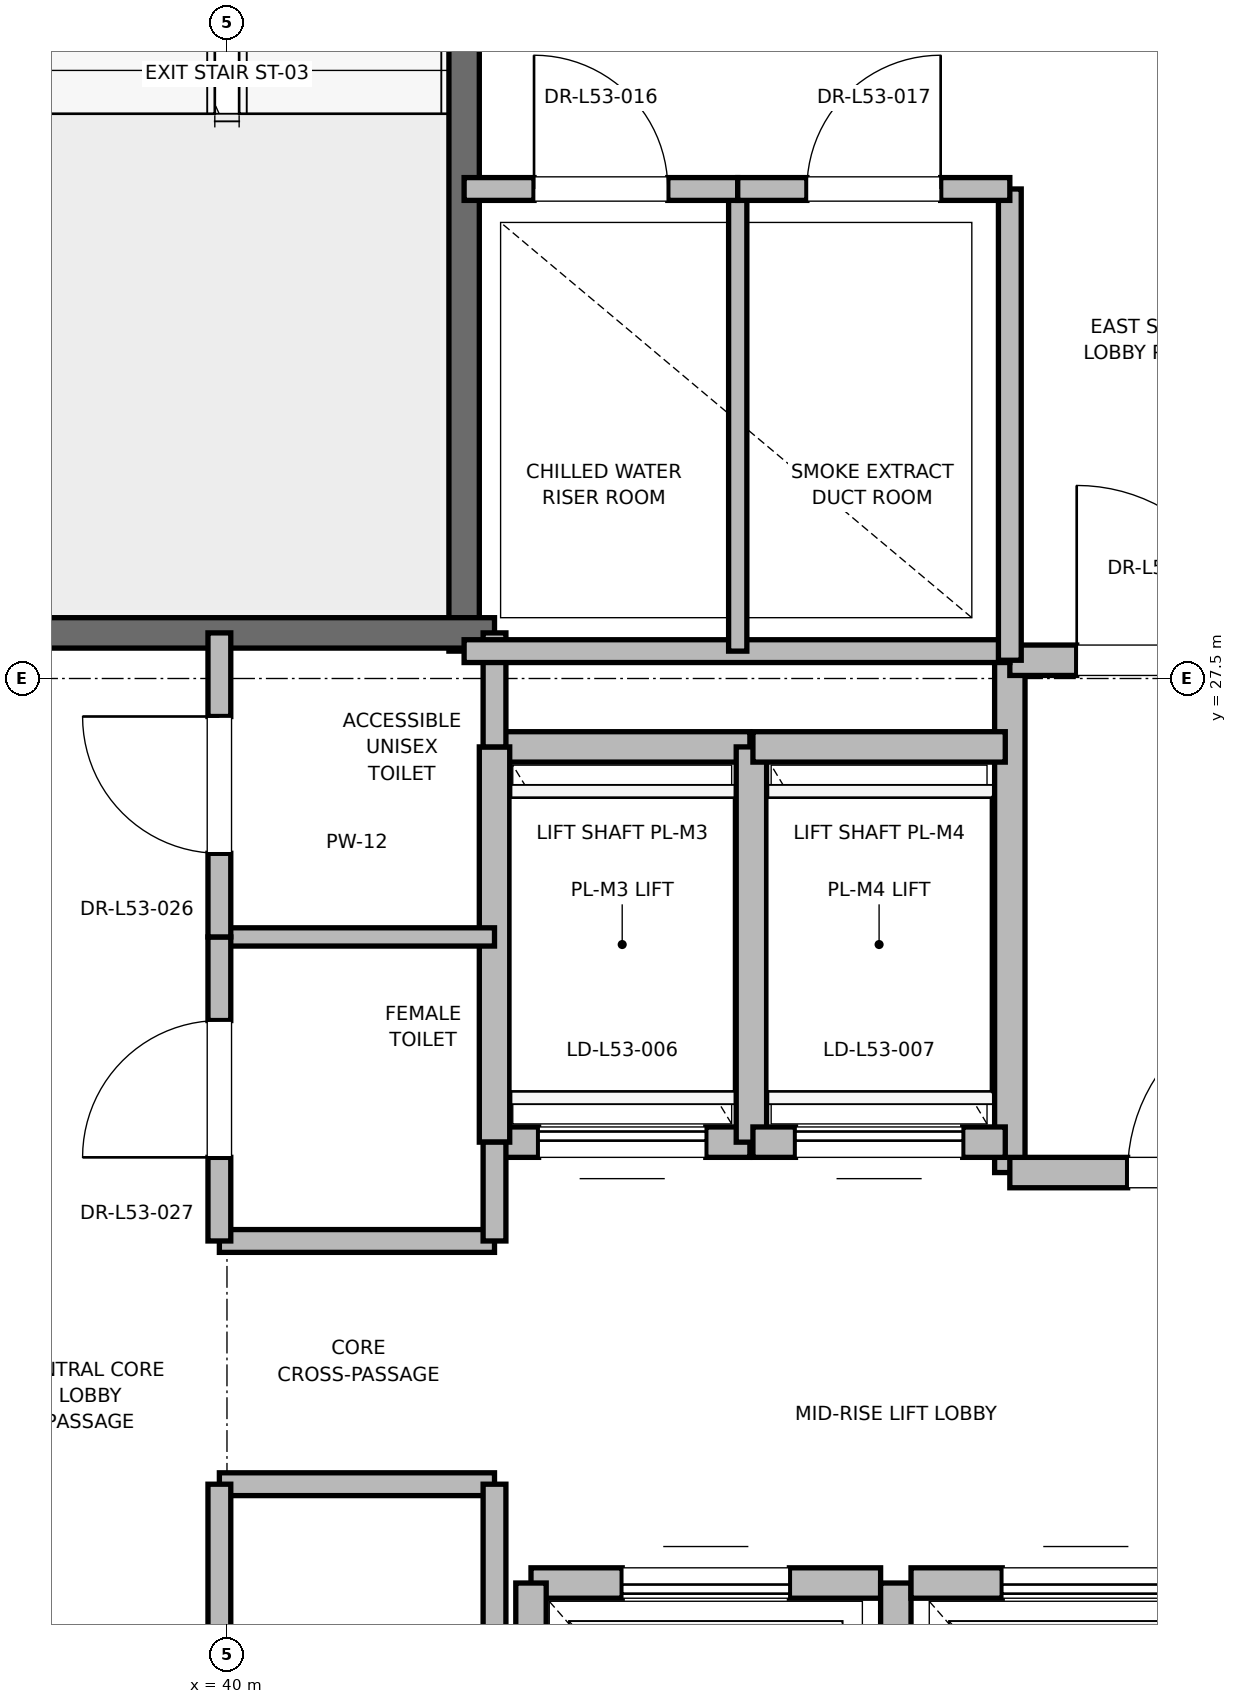
"""IFC4 building model, lengths in metres.
Left out: names, types, materials, properties, quantities, classifications, styles, units other than length and angle.
Written with IfcOpenShell. Run it as: python <this file> out.ifc"""

import sys

from ifc_helpers import new_model, si_unit, direction, frame, frame_2d, origin, place, context, subcontext, project, spatial, rectangle, extrude, element, fill, save


model = new_model("IFC4")
c1 = context("Model", 3, precision=1e-05, world=origin(), true_north=direction((0.0, 1.0)))
c2 = subcontext(c1, "Body", "Model", "MODEL_VIEW")
j1 = project(units=[si_unit("LENGTHUNIT", "METRE"), si_unit("PLANEANGLEUNIT", "RADIAN")], contexts=[c1])
p1 = place(None, origin())
s1 = spatial("IfcSite", under=j1, at=p1, CompositionType="ELEMENT")
p2 = place(p1, origin())
s2 = spatial("IfcBuilding", under=s1, at=p2, CompositionType="ELEMENT")
p3 = place(p2, frame((0.0, 0.0, 229.2)))
s3 = spatial("IfcBuildingStorey", under=s2, at=p3, CompositionType="ELEMENT", Elevation=229.2)
p4 = place(p3, frame((41.56, 27.68, 0.0), z_axis=(0.0, 0.0, 1.0), x_axis=(0.0, 1.0, 0.0)))
e1 = element("IfcWall", 1, at=p4, inside=s3, PredefinedType="SOLIDWALL", context=c2, shape_type="SweptSolid", body=[
    extrude(rectangle(XDim=8.57, YDim=0.2, at=frame_2d((4.285, 0.0))), origin(), (0.0, 0.0, 1.0), 3.7),
])
p5 = place(p3, frame((38.44, 27.8, 0.0), z_axis=(0.0, 0.0, 1.0), x_axis=(1.0, 0.0, 0.0)))
e2 = element("IfcWall", 2, at=p5, inside=s3, PredefinedType="SOLIDWALL", context=c2, shape_type="SweptSolid", body=[
    extrude(rectangle(XDim=3.32, YDim=0.2, at=frame_2d((1.66, 0.0))), origin(), (0.0, 0.0, 1.0), 3.7),
])
p6 = place(p3, frame((45.15, 24.25, 0.0), z_axis=(0.0, 0.0, 1.0), x_axis=(0.0, 1.0, 0.0)))
e3 = element("IfcWall", 3, at=p6, inside=s3, PredefinedType="PARTITIONING", context=c2, shape_type="SweptSolid", body=[
    extrude(rectangle(XDim=3.37, YDim=0.2, at=frame_2d((1.685, 0.0))), origin(), (0.0, 0.0, 1.0), 3.7),
])
p7 = place(p3, frame((45.15, 24.25, 0.0), z_axis=(0.0, 0.0, 1.0), x_axis=(1.0, 0.0, 0.0)))
e4 = element("IfcWall", 4, at=p7, inside=s3, PredefinedType="PARTITIONING", context=c2, shape_type="SweptSolid", body=[
    extrude(rectangle(XDim=2.7, YDim=0.2, at=frame_2d((1.35, 0.0))), origin(), (0.0, 0.0, 1.0), 3.7),
])
p8 = place(p7, frame((0.775, 0.0, 0.0)))
e5 = element("IfcOpeningElement", 5, at=p8, cuts=e4, PredefinedType="OPENING", context=c2, shape_type="SweptSolid", body=[
    extrude(rectangle(XDim=1.15, YDim=2.2, at=frame_2d((0.575, 1.1))), frame((0.0, 0.1, 0.0), z_axis=(0.0, -1.0, 0.0), x_axis=(1.0, 0.0, 0.0)), (0.0, 0.0, 1.0), 0.2),
])
p9 = place(p3, frame((45.15, 27.62, 0.0), z_axis=(0.0, 0.0, 1.0), x_axis=(1.0, 0.0, 0.0)))
e6 = element("IfcWall", 6, at=p9, inside=s3, PredefinedType="PARTITIONING", context=c2, shape_type="SweptSolid", body=[
    extrude(rectangle(XDim=2.03, YDim=0.2, at=frame_2d((1.015, 0.0))), origin(), (0.0, 0.0, 1.0), 3.7),
])
p10 = place(p9, frame((0.44, 0.0, 0.0)))
e7 = element("IfcOpeningElement", 7, at=p10, cuts=e6, PredefinedType="OPENING", context=c2, shape_type="SweptSolid", body=[
    extrude(rectangle(XDim=1.15, YDim=2.2, at=frame_2d((0.575, 1.1))), frame((0.0, 0.1, 0.0), z_axis=(0.0, -1.0, 0.0), x_axis=(1.0, 0.0, 0.0)), (0.0, 0.0, 1.0), 0.2),
])
p11 = place(p3, frame((44.3, 21.55, 0.0), z_axis=(0.0, 0.0, 1.0), x_axis=(-1.0, 0.0, 0.0)))
e8 = element("IfcWall", 8, at=p11, inside=s3, PredefinedType="SOLIDWALL", context=c2, shape_type="SweptSolid", body=[
    extrude(rectangle(XDim=2.3, YDim=0.2, at=frame_2d((1.15, 0.0))), origin(), (0.0, 0.0, 1.0), 3.7),
])
p12 = place(p11, frame((0.6, 0.0, 0.0)))
e9 = element("IfcOpeningElement", 9, at=p12, cuts=e8, PredefinedType="OPENING", context=c2, shape_type="SweptSolid", body=[
    extrude(rectangle(XDim=1.1, YDim=2.2, at=frame_2d((0.55, 1.1))), frame((0.0, 0.1, 0.0), z_axis=(0.0, -1.0, 0.0), x_axis=(1.0, 0.0, 0.0)), (0.0, 0.0, 1.0), 0.2),
])
p13 = place(p3, frame((42.0, 21.55, 0.0), z_axis=(0.0, 0.0, 1.0), x_axis=(0.0, -1.0, 0.0)))
e10 = element("IfcWall", 10, at=p13, inside=s3, PredefinedType="SOLIDWALL", context=c2, shape_type="SweptSolid", body=[
    extrude(rectangle(XDim=2.6, YDim=0.2, at=frame_2d((1.3, 0.0))), origin(), (0.0, 0.0, 1.0), 2.68),
])
p14 = place(p3, frame((44.4, 18.95, 0.0), z_axis=(0.0, 0.0, 1.0), x_axis=(0.0, 1.0, 0.0)))
e11 = element("IfcWall", 11, at=p14, inside=s3, PredefinedType="SOLIDWALL", context=c2, shape_type="SweptSolid", body=[
    extrude(rectangle(XDim=2.6, YDim=0.2, at=frame_2d((1.3, 0.0))), origin(), (0.0, 0.0, 1.0), 3.7),
])
p15 = place(p3, frame((46.8, 21.55, 0.0), z_axis=(0.0, 0.0, 1.0), x_axis=(-1.0, 0.0, 0.0)))
e12 = element("IfcWall", 12, at=p15, inside=s3, PredefinedType="SOLIDWALL", context=c2, shape_type="SweptSolid", body=[
    extrude(rectangle(XDim=2.3, YDim=0.2, at=frame_2d((1.15, 0.0))), origin(), (0.0, 0.0, 1.0), 3.7),
])
p16 = place(p15, frame((0.6, 0.0, 0.0)))
e13 = element("IfcOpeningElement", 13, at=p16, cuts=e12, PredefinedType="OPENING", context=c2, shape_type="SweptSolid", body=[
    extrude(rectangle(XDim=1.1, YDim=2.2, at=frame_2d((0.55, 1.1))), frame((0.0, 0.1, 0.0), z_axis=(0.0, -1.0, 0.0), x_axis=(1.0, 0.0, 0.0)), (0.0, 0.0, 1.0), 0.2),
])
p17 = place(p3, frame((41.76, 24.45, 0.0), z_axis=(0.0, 0.0, 1.0), x_axis=(1.0, 0.0, 0.0)))
e14 = element("IfcWall", 14, at=p17, inside=s3, PredefinedType="SOLIDWALL", context=c2, shape_type="SweptSolid", body=[
    extrude(rectangle(XDim=1.68, YDim=0.2, at=frame_2d((0.84, 0.0))), origin(), (0.0, 0.0, 1.0), 3.7),
])
p18 = place(p17, frame((0.29, 0.0, 0.0)))
e15 = element("IfcOpeningElement", 15, at=p18, cuts=e14, PredefinedType="OPENING", context=c2, shape_type="SweptSolid", body=[
    extrude(rectangle(XDim=1.1, YDim=2.2, at=frame_2d((0.55, 1.1))), frame((0.0, 0.1, 0.0), z_axis=(0.0, -1.0, 0.0), x_axis=(1.0, 0.0, 0.0)), (0.0, 0.0, 1.0), 0.2),
])
p19 = place(p3, frame((43.44, 27.05, 0.0), z_axis=(0.0, 0.0, 1.0), x_axis=(-1.0, 0.0, 0.0)))
e16 = element("IfcWall", 16, at=p19, inside=s3, PredefinedType="SOLIDWALL", context=c2, shape_type="SweptSolid", body=[
    extrude(rectangle(XDim=1.68, YDim=0.2, at=frame_2d((0.84, 0.0))), origin(), (0.0, 0.0, 1.0), 3.7),
])
for number, where, z_axis, x_axis in (
    (17, (41.76, 27.05, 0.0), (0.0, 0.0, 1.0), (0.0, -1.0, 0.0)),
    (18, (43.45, 24.45, 0.0), (0.0, 0.0, 1.0), (0.0, 1.0, 0.0)),
):
    element("IfcWall", number, at=place(p3, frame(where, z_axis=z_axis, x_axis=x_axis)), inside=s3, PredefinedType="SOLIDWALL", context=c2, shape_type="SweptSolid", body=[
        extrude(rectangle(XDim=2.6, YDim=0.2, at=frame_2d((1.3, 0.0))), origin(), (0.0, 0.0, 1.0), 3.7),
    ])
p20 = place(p3, frame((43.46, 24.45, 0.0), z_axis=(0.0, 0.0, 1.0), x_axis=(1.0, 0.0, 0.0)))
e19 = element("IfcWall", 19, at=p20, inside=s3, PredefinedType="SOLIDWALL", context=c2, shape_type="SweptSolid", body=[
    extrude(rectangle(XDim=1.66, YDim=0.2, at=frame_2d((0.83, 0.0))), origin(), (0.0, 0.0, 1.0), 3.7),
])
p21 = place(p20, frame((0.28, 0.0, 0.0)))
e20 = element("IfcOpeningElement", 20, at=p21, cuts=e19, PredefinedType="OPENING", context=c2, shape_type="SweptSolid", body=[
    extrude(rectangle(XDim=1.1, YDim=2.2, at=frame_2d((0.55, 1.1))), frame((0.0, 0.1, 0.0), z_axis=(0.0, -1.0, 0.0), x_axis=(1.0, 0.0, 0.0)), (0.0, 0.0, 1.0), 0.2),
])
p22 = place(p3, frame((45.12, 27.05, 0.0), z_axis=(0.0, 0.0, 1.0), x_axis=(-1.0, 0.0, 0.0)))
e21 = element("IfcWall", 21, at=p22, inside=s3, PredefinedType="SOLIDWALL", context=c2, shape_type="SweptSolid", body=[
    extrude(rectangle(XDim=1.66, YDim=0.2, at=frame_2d((0.83, 0.0))), origin(), (0.0, 0.0, 1.0), 3.7),
])
for number, where, z_axis, x_axis in (
    (22, (39.95, 22.2, 0.0), (0.0, 0.0, 1.0), (1.0, 0.0, 0.0)),
    (23, (39.95, 23.8, 0.0), (0.0, 0.0, 1.0), (1.0, 0.0, 0.0)),
):
    element("IfcWall", number, at=place(p3, frame(where, z_axis=z_axis, x_axis=x_axis)), inside=s3, PredefinedType="PARTITIONING", context=c2, shape_type="SweptSolid", body=[
        extrude(rectangle(XDim=1.81, YDim=0.15, at=frame_2d((0.905, 0.0))), origin(), (0.0, 0.0, 1.0), 2.85),
    ])
p23 = place(p3, frame((39.95, 25.8, 0.0), z_axis=(0.0, 0.0, 1.0), x_axis=(1.0, 0.0, 0.0)))
e24 = element("IfcWall", 24, at=p23, inside=s3, PredefinedType="PARTITIONING", context=c2, shape_type="SweptSolid", body=[
    extrude(rectangle(XDim=1.81, YDim=0.12, at=frame_2d((0.905, 0.0))), origin(), (0.0, 0.0, 1.0), 2.85),
])
p24 = place(p3, frame((41.76, 18.6, 0.0), z_axis=(0.0, 0.0, 1.0), x_axis=(0.0, 1.0, 0.0)))
e25 = element("IfcWall", 25, at=p24, inside=s3, PredefinedType="PARTITIONING", context=c2, shape_type="SweptSolid", body=[
    extrude(rectangle(XDim=3.6, YDim=0.15, at=frame_2d((1.8, 0.0))), origin(), (0.0, 0.0, 1.0), 2.68),
])
p25 = place(p3, frame((41.76, 23.8, 0.0), z_axis=(0.0, 0.0, 1.0), x_axis=(0.0, 1.0, 0.0)))
e26 = element("IfcWall", 26, at=p25, inside=s3, PredefinedType="PARTITIONING", context=c2, shape_type="SweptSolid", body=[
    extrude(rectangle(XDim=0.65, YDim=0.15, at=frame_2d((0.325, 0.0))), origin(), (0.0, 0.0, 1.0), 2.85),
])
p26 = place(p3, frame((41.76, 27.05, 0.0), z_axis=(0.0, 0.0, 1.0), x_axis=(0.0, 1.0, 0.0)))
e27 = element("IfcWall", 27, at=p26, inside=s3, PredefinedType="PARTITIONING", context=c2, shape_type="SweptSolid", body=[
    extrude(rectangle(XDim=0.75, YDim=0.15, at=frame_2d((0.375, 0.0))), origin(), (0.0, 0.0, 1.0), 2.85),
])
p27 = place(p3, frame((39.95, 19.2, 0.0), z_axis=(0.0, 0.0, 1.0), x_axis=(0.0, 1.0, 0.0)))
e28 = element("IfcWall", 28, at=p27, inside=s3, PredefinedType="PARTITIONING", context=c2, shape_type="SweptSolid", body=[
    extrude(rectangle(XDim=3.0, YDim=0.15, at=frame_2d((1.5, 0.0))), origin(), (0.0, 0.0, 1.0), 2.85),
])
p28 = place(p27, frame((1.05, 0.0, 0.0)))
e29 = element("IfcOpeningElement", 29, at=p28, cuts=e28, PredefinedType="OPENING", context=c2, shape_type="SweptSolid", body=[
    extrude(rectangle(XDim=0.9, YDim=2.1, at=frame_2d((0.45, 1.05))), frame((0.0, 0.075, 0.0), z_axis=(0.0, -1.0, 0.0), x_axis=(1.0, 0.0, 0.0)), (0.0, 0.0, 1.0), 0.15),
])
p29 = place(p3, frame((39.95, 23.8, 0.0), z_axis=(0.0, 0.0, 1.0), x_axis=(0.0, 1.0, 0.0)))
e30 = element("IfcWall", 30, at=p29, inside=s3, PredefinedType="PARTITIONING", context=c2, shape_type="SweptSolid", body=[
    extrude(rectangle(XDim=2.0, YDim=0.15, at=frame_2d((1.0, 0.0))), origin(), (0.0, 0.0, 1.0), 2.85),
])
p30 = place(p29, frame((0.55, 0.0, 0.0)))
e31 = element("IfcOpeningElement", 31, at=p30, cuts=e30, PredefinedType="OPENING", context=c2, shape_type="SweptSolid", body=[
    extrude(rectangle(XDim=0.9, YDim=2.1, at=frame_2d((0.45, 1.05))), frame((0.0, 0.075, 0.0), z_axis=(0.0, -1.0, 0.0), x_axis=(1.0, 0.0, 0.0)), (0.0, 0.0, 1.0), 0.15),
])
p31 = place(p3, frame((39.95, 25.8, 0.0), z_axis=(0.0, 0.0, 1.0), x_axis=(0.0, 1.0, 0.0)))
e32 = element("IfcWall", 32, at=p31, inside=s3, PredefinedType="PARTITIONING", context=c2, shape_type="SweptSolid", body=[
    extrude(rectangle(XDim=2.0, YDim=0.15, at=frame_2d((1.0, 0.0))), origin(), (0.0, 0.0, 1.0), 2.85),
])
p32 = place(p31, frame((0.55, 0.0, 0.0)))
e33 = element("IfcOpeningElement", 33, at=p32, cuts=e32, PredefinedType="OPENING", context=c2, shape_type="SweptSolid", body=[
    extrude(rectangle(XDim=0.9, YDim=2.1, at=frame_2d((0.45, 1.05))), frame((0.0, 0.075, 0.0), z_axis=(0.0, -1.0, 0.0), x_axis=(1.0, 0.0, 0.0)), (0.0, 0.0, 1.0), 0.15),
])
p33 = place(p3, frame((41.56, 27.68, 0.0), z_axis=(0.0, 0.0, 1.0), x_axis=(1.0, 0.0, 0.0)))
e34 = element("IfcWall", 34, at=p33, inside=s3, PredefinedType="PARTITIONING", context=c2, shape_type="SweptSolid", body=[
    extrude(rectangle(XDim=3.59, YDim=0.15, at=frame_2d((1.795, 0.0))), origin(), (0.0, 0.0, 1.0), 2.85),
])
p34 = place(p3, frame((45.15, 27.62, 0.0), z_axis=(0.0, 0.0, 1.0), x_axis=(0.0, 1.0, 0.0)))
e35 = element("IfcWall", 35, at=p34, inside=s3, PredefinedType="PARTITIONING", context=c2, shape_type="SweptSolid", body=[
    extrude(rectangle(XDim=3.1, YDim=0.15, at=frame_2d((1.55, 0.0))), origin(), (0.0, 0.0, 1.0), 2.85),
])
p35 = place(p3, frame((43.36, 27.68, 0.0), z_axis=(0.0, 0.0, 1.0), x_axis=(0.0, 1.0, 0.0)))
e36 = element("IfcWall", 36, at=p35, inside=s3, PredefinedType="PARTITIONING", context=c2, shape_type="SweptSolid", body=[
    extrude(rectangle(XDim=3.04, YDim=0.12, at=frame_2d((1.52, 0.0))), origin(), (0.0, 0.0, 1.0), 2.85),
])
p36 = place(p3, frame((41.56, 30.72, 0.0), z_axis=(0.0, 0.0, 1.0), x_axis=(1.0, 0.0, 0.0)))
e37 = element("IfcWall", 37, at=p36, inside=s3, PredefinedType="PARTITIONING", context=c2, shape_type="SweptSolid", body=[
    extrude(rectangle(XDim=1.8, YDim=0.15, at=frame_2d((0.9, 0.0))), origin(), (0.0, 0.0, 1.0), 2.85),
])
p37 = place(p36, frame((0.46, 0.0, 0.0)))
e38 = element("IfcOpeningElement", 38, at=p37, cuts=e37, PredefinedType="OPENING", context=c2, shape_type="SweptSolid", body=[
    extrude(rectangle(XDim=0.88, YDim=2.1, at=frame_2d((0.44, 1.05))), frame((0.0, 0.075, 0.0), z_axis=(0.0, -1.0, 0.0), x_axis=(1.0, 0.0, 0.0)), (0.0, 0.0, 1.0), 0.15),
])
p38 = place(p3, frame((43.36, 30.72, 0.0), z_axis=(0.0, 0.0, 1.0), x_axis=(1.0, 0.0, 0.0)))
e39 = element("IfcWall", 39, at=p38, inside=s3, PredefinedType="PARTITIONING", context=c2, shape_type="SweptSolid", body=[
    extrude(rectangle(XDim=1.79, YDim=0.15, at=frame_2d((0.895, 0.0))), origin(), (0.0, 0.0, 1.0), 2.85),
])
p39 = place(p38, frame((0.455, 0.0, 0.0)))
e40 = element("IfcOpeningElement", 40, at=p39, cuts=e39, PredefinedType="OPENING", context=c2, shape_type="SweptSolid", body=[
    extrude(rectangle(XDim=0.88, YDim=2.1, at=frame_2d((0.44, 1.05))), frame((0.0, 0.075, 0.0), z_axis=(0.0, -1.0, 0.0), x_axis=(1.0, 0.0, 0.0)), (0.0, 0.0, 1.0), 0.15),
])
p40 = place(p8, origin())
e41 = element("IfcDoor", 41, at=p40, inside=s3, OperationType="SINGLE_SWING_RIGHT", PredefinedType="DOOR", context=c2, shape_type="SweptSolid", body=[
    extrude(rectangle(XDim=1.15, YDim=2.2, at=frame_2d((0.575, 1.1))), frame((0.0, 0.025, 0.0), z_axis=(0.0, -1.0, 0.0), x_axis=(1.0, 0.0, 0.0)), (0.0, 0.0, 1.0), 0.05),
])
fill(e5, e41)
p41 = place(p10, origin())
e42 = element("IfcDoor", 42, at=p41, inside=s3, OperationType="SINGLE_SWING_LEFT", PredefinedType="DOOR", context=c2, shape_type="SweptSolid", body=[
    extrude(rectangle(XDim=1.15, YDim=2.2, at=frame_2d((0.575, 1.1))), frame((0.0, 0.025, 0.0), z_axis=(0.0, -1.0, 0.0), x_axis=(1.0, 0.0, 0.0)), (0.0, 0.0, 1.0), 0.05),
])
fill(e7, e42)
p42 = place(p12, origin())
e43 = element("IfcDoor", 43, at=p42, inside=s3, OperationType="SLIDING_TO_RIGHT", PredefinedType="DOOR", context=c2, shape_type="SweptSolid", body=[
    extrude(rectangle(XDim=1.1, YDim=2.2, at=frame_2d((0.55, 1.1))), frame((0.0, 0.025, 0.0), z_axis=(0.0, -1.0, 0.0), x_axis=(1.0, 0.0, 0.0)), (0.0, 0.0, 1.0), 0.05),
])
fill(e9, e43)
p43 = place(p16, origin())
e44 = element("IfcDoor", 44, at=p43, inside=s3, OperationType="SLIDING_TO_RIGHT", PredefinedType="DOOR", context=c2, shape_type="SweptSolid", body=[
    extrude(rectangle(XDim=1.1, YDim=2.2, at=frame_2d((0.55, 1.1))), frame((0.0, 0.025, 0.0), z_axis=(0.0, -1.0, 0.0), x_axis=(1.0, 0.0, 0.0)), (0.0, 0.0, 1.0), 0.05),
])
fill(e13, e44)
p44 = place(p18, origin())
e45 = element("IfcDoor", 45, at=p44, inside=s3, OperationType="SLIDING_TO_RIGHT", PredefinedType="DOOR", context=c2, shape_type="SweptSolid", body=[
    extrude(rectangle(XDim=1.1, YDim=2.2, at=frame_2d((0.55, 1.1))), frame((0.0, 0.025, 0.0), z_axis=(0.0, -1.0, 0.0), x_axis=(1.0, 0.0, 0.0)), (0.0, 0.0, 1.0), 0.05),
])
fill(e15, e45)
p45 = place(p21, origin())
e46 = element("IfcDoor", 46, at=p45, inside=s3, OperationType="SLIDING_TO_RIGHT", PredefinedType="DOOR", context=c2, shape_type="SweptSolid", body=[
    extrude(rectangle(XDim=1.1, YDim=2.2, at=frame_2d((0.55, 1.1))), frame((0.0, 0.025, 0.0), z_axis=(0.0, -1.0, 0.0), x_axis=(1.0, 0.0, 0.0)), (0.0, 0.0, 1.0), 0.05),
])
fill(e20, e46)
p46 = place(p30, origin())
e47 = element("IfcDoor", 47, at=p46, inside=s3, OperationType="SINGLE_SWING_LEFT", PredefinedType="DOOR", context=c2, shape_type="SweptSolid", body=[
    extrude(rectangle(XDim=0.9, YDim=2.1, at=frame_2d((0.45, 1.05))), frame((0.0, 0.025, 0.0), z_axis=(0.0, -1.0, 0.0), x_axis=(1.0, 0.0, 0.0)), (0.0, 0.0, 1.0), 0.05),
])
fill(e31, e47)
p47 = place(p32, origin())
e48 = element("IfcDoor", 48, at=p47, inside=s3, OperationType="SINGLE_SWING_RIGHT", PredefinedType="DOOR", context=c2, shape_type="SweptSolid", body=[
    extrude(rectangle(XDim=0.9, YDim=2.1, at=frame_2d((0.45, 1.05))), frame((0.0, 0.025, 0.0), z_axis=(0.0, -1.0, 0.0), x_axis=(1.0, 0.0, 0.0)), (0.0, 0.0, 1.0), 0.05),
])
fill(e33, e48)
p48 = place(p37, origin())
e49 = element("IfcDoor", 49, at=p48, inside=s3, OperationType="SINGLE_SWING_LEFT", PredefinedType="DOOR", context=c2, shape_type="SweptSolid", body=[
    extrude(rectangle(XDim=0.88, YDim=2.1, at=frame_2d((0.44, 1.05))), frame((0.0, 0.025, 0.0), z_axis=(0.0, -1.0, 0.0), x_axis=(1.0, 0.0, 0.0)), (0.0, 0.0, 1.0), 0.05),
])
fill(e38, e49)
p49 = place(p39, origin())
e50 = element("IfcDoor", 50, at=p49, inside=s3, OperationType="SINGLE_SWING_RIGHT", PredefinedType="DOOR", context=c2, shape_type="SweptSolid", body=[
    extrude(rectangle(XDim=0.88, YDim=2.1, at=frame_2d((0.44, 1.05))), frame((0.0, 0.025, 0.0), z_axis=(0.0, -1.0, 0.0), x_axis=(1.0, 0.0, 0.0)), (0.0, 0.0, 1.0), 0.05),
])
fill(e40, e50)
save(model, sys.argv[1])
